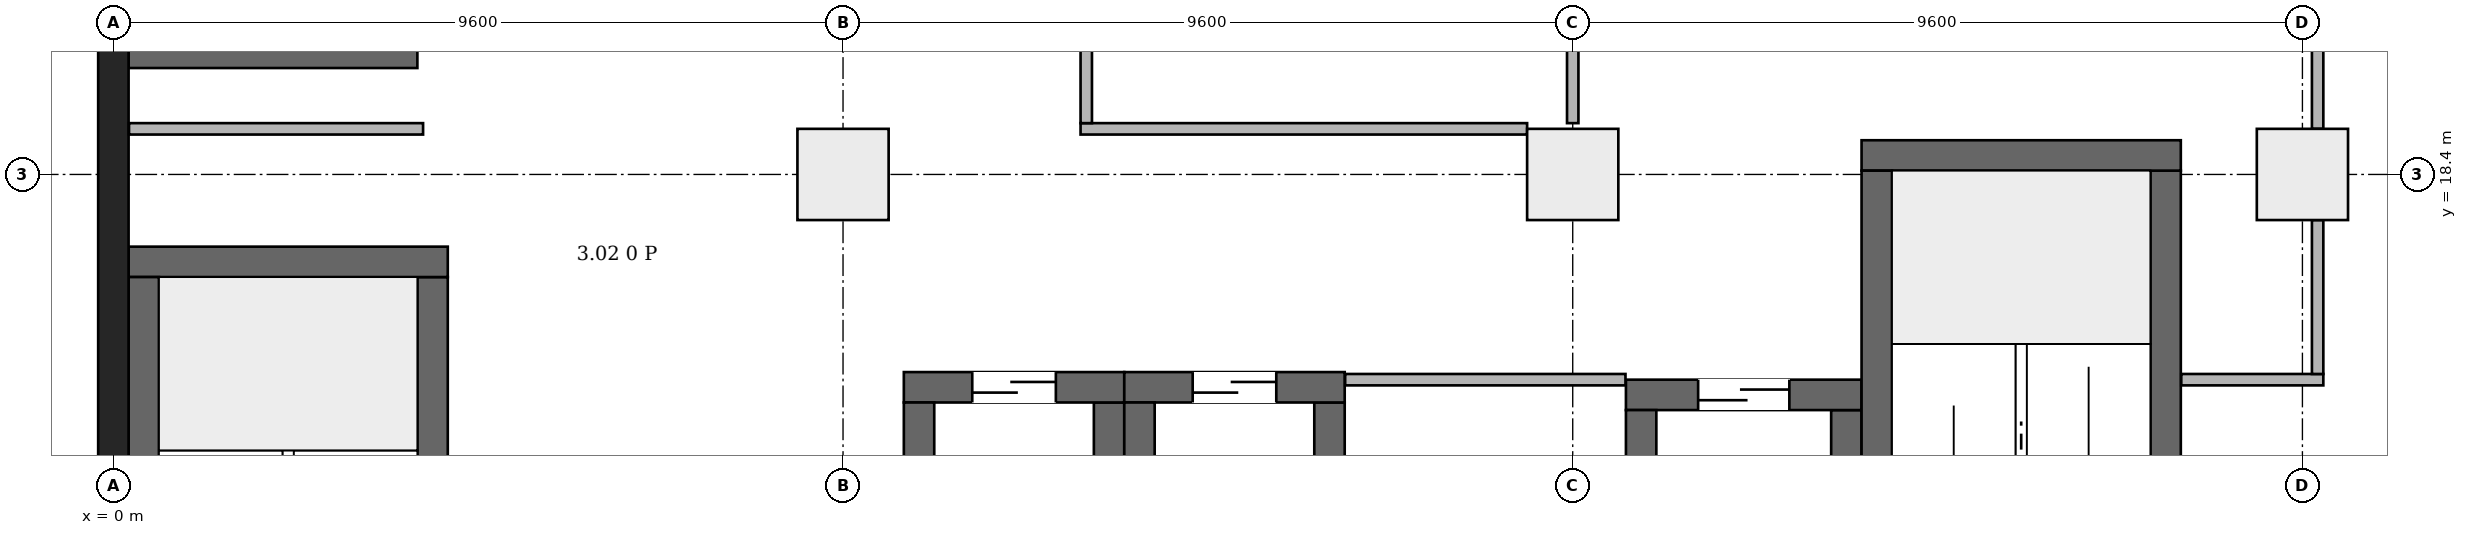
"""IFC4 building model, lengths in metres.
Left out: names, types, materials, properties, quantities, classifications, styles, units other than length and angle.
Written with IfcOpenShell. Run it as: python <this file> out.ifc"""

import sys

from ifc_helpers import new_model, si_unit, direction, frame, frame_2d, origin, origin_2d, place, context, subcontext, project, spatial, rectangle, extrude, element, fill, save


model = new_model("IFC4")
c1 = context("Model", 3, precision=1e-05, world=origin(), true_north=direction((0.0, 1.0)))
c2 = subcontext(c1, "Body", "Model", "MODEL_VIEW")
j1 = project(units=[si_unit("LENGTHUNIT", "METRE"), si_unit("PLANEANGLEUNIT", "RADIAN")], contexts=[c1])
p1 = place(None, origin())
s1 = spatial("IfcSite", under=j1, at=p1, CompositionType="ELEMENT")
p2 = place(p1, origin())
s2 = spatial("IfcBuilding", under=s1, at=p2, CompositionType="ELEMENT")
p3 = place(p2, frame((0.0, 0.0, 21.7)))
s3 = spatial("IfcBuildingStorey", under=s2, at=p3, CompositionType="ELEMENT", Elevation=21.7)
p4 = place(p3, frame((0.0, -0.2, 0.0), z_axis=(0.0, 0.0, 1.0), x_axis=(0.0, 1.0, 0.0)))
e1 = element("IfcWall", 1, at=p4, inside=s3, PredefinedType="SHEAR", context=c2, shape_type="SweptSolid", body=[
    extrude(rectangle(XDim=46.88, YDim=0.4, at=frame_2d((23.44, 0.0))), origin(), (0.0, 0.0, 1.0), 5.0),
])
p5 = place(p3, frame((0.2, 17.25, 0.0), z_axis=(0.0, 0.0, 1.0), x_axis=(1.0, 0.0, 0.0)))
e2 = element("IfcWall", 2, at=p5, inside=s3, PredefinedType="SHEAR", context=c2, shape_type="SweptSolid", body=[
    extrude(rectangle(XDim=4.2, YDim=0.4, at=frame_2d((2.1, 0.0))), origin(), (0.0, 0.0, 1.0), 5.0),
])
for number, where, z_axis, x_axis in (
    (3, (0.4, 10.45, 0.0), (0.0, 0.0, 1.0), (0.0, 1.0, 0.0)),
    (4, (4.2, 10.45, 0.0), (0.0, 0.0, 1.0), (0.0, 1.0, 0.0)),
):
    element("IfcWall", number, at=place(p3, frame(where, z_axis=z_axis, x_axis=x_axis)), inside=s3, PredefinedType="SHEAR", context=c2, shape_type="SweptSolid", body=[
        extrude(rectangle(XDim=6.6, YDim=0.4, at=frame_2d((3.3, 0.0))), origin(), (0.0, 0.0, 1.0), 5.0),
    ])
p6 = place(p3, frame((23.0, 18.65, 0.0), z_axis=(0.0, 0.0, 1.0), x_axis=(1.0, 0.0, 0.0)))
e5 = element("IfcWall", 5, at=p6, inside=s3, PredefinedType="SHEAR", context=c2, shape_type="SweptSolid", body=[
    extrude(rectangle(XDim=4.2, YDim=0.4, at=frame_2d((2.1, 0.0))), origin(), (0.0, 0.0, 1.0), 5.0),
])
for number, where, z_axis, x_axis in (
    (6, (23.2, 11.85, 0.0), (0.0, 0.0, 1.0), (0.0, 1.0, 0.0)),
    (7, (27.0, 11.85, 0.0), (0.0, 0.0, 1.0), (0.0, 1.0, 0.0)),
):
    element("IfcWall", number, at=place(p3, frame(where, z_axis=z_axis, x_axis=x_axis)), inside=s3, PredefinedType="SHEAR", context=c2, shape_type="SweptSolid", body=[
        extrude(rectangle(XDim=6.6, YDim=0.4, at=frame_2d((3.3, 0.0))), origin(), (0.0, 0.0, 1.0), 5.0),
    ])
p7 = place(p3, frame((0.2, 19.975, 0.0), z_axis=(0.0, 0.0, 1.0), x_axis=(1.0, 0.0, 0.0)))
e8 = element("IfcWall", 8, at=p7, inside=s3, PredefinedType="SHEAR", context=c2, shape_type="SweptSolid", body=[
    extrude(rectangle(XDim=3.8, YDim=0.35, at=frame_2d((1.9, 0.0))), origin(), (0.0, 0.0, 1.0), 5.0),
])
p8 = place(p3, frame((10.4, 15.6, 0.0), z_axis=(0.0, 0.0, 1.0), x_axis=(1.0, 0.0, 0.0)))
e9 = element("IfcWall", 9, at=p8, inside=s3, PredefinedType="SHEAR", context=c2, shape_type="SweptSolid", body=[
    extrude(rectangle(XDim=2.9, YDim=0.4, at=frame_2d((1.45, 0.0))), origin(), (0.0, 0.0, 1.0), 5.0),
])
p9 = place(p8, frame((0.9, 0.0, 0.0)))
e10 = element("IfcOpeningElement", 10, at=p9, cuts=e9, PredefinedType="OPENING", context=c2, shape_type="SweptSolid", body=[
    extrude(rectangle(XDim=1.1, YDim=2.1, at=frame_2d((0.55, 1.05))), frame((0.0, 0.21, 0.0), z_axis=(0.0, -1.0, 0.0), x_axis=(1.0, 0.0, 0.0)), (0.0, 0.0, 1.0), 0.42),
])
for number, where, z_axis, x_axis in (
    (11, (10.6, 12.4, 0.0), (0.0, 0.0, 1.0), (0.0, 1.0, 0.0)),
    (12, (13.1, 12.4, 0.0), (0.0, 0.0, 1.0), (0.0, 1.0, 0.0)),
):
    element("IfcWall", number, at=place(p3, frame(where, z_axis=z_axis, x_axis=x_axis)), inside=s3, PredefinedType="SHEAR", context=c2, shape_type="SweptSolid", body=[
        extrude(rectangle(XDim=3.0, YDim=0.4, at=frame_2d((1.5, 0.0))), origin(), (0.0, 0.0, 1.0), 5.0),
    ])
p10 = place(p3, frame((13.3, 15.6, 0.0), z_axis=(0.0, 0.0, 1.0), x_axis=(1.0, 0.0, 0.0)))
e13 = element("IfcWall", 13, at=p10, inside=s3, PredefinedType="SHEAR", context=c2, shape_type="SweptSolid", body=[
    extrude(rectangle(XDim=2.9, YDim=0.4, at=frame_2d((1.45, 0.0))), origin(), (0.0, 0.0, 1.0), 5.0),
])
p11 = place(p10, frame((0.9, 0.0, 0.0)))
e14 = element("IfcOpeningElement", 14, at=p11, cuts=e13, PredefinedType="OPENING", context=c2, shape_type="SweptSolid", body=[
    extrude(rectangle(XDim=1.1, YDim=2.1, at=frame_2d((0.55, 1.05))), frame((0.0, 0.21, 0.0), z_axis=(0.0, -1.0, 0.0), x_axis=(1.0, 0.0, 0.0)), (0.0, 0.0, 1.0), 0.42),
])
for number, where, z_axis, x_axis in (
    (15, (13.5, 12.4, 0.0), (0.0, 0.0, 1.0), (0.0, 1.0, 0.0)),
    (16, (16.0, 12.4, 0.0), (0.0, 0.0, 1.0), (0.0, 1.0, 0.0)),
):
    element("IfcWall", number, at=place(p3, frame(where, z_axis=z_axis, x_axis=x_axis)), inside=s3, PredefinedType="SHEAR", context=c2, shape_type="SweptSolid", body=[
        extrude(rectangle(XDim=3.0, YDim=0.4, at=frame_2d((1.5, 0.0))), origin(), (0.0, 0.0, 1.0), 5.0),
    ])
p12 = place(p3, frame((19.9, 15.5, 0.0), z_axis=(0.0, 0.0, 1.0), x_axis=(1.0, 0.0, 0.0)))
e17 = element("IfcWall", 17, at=p12, inside=s3, PredefinedType="SHEAR", context=c2, shape_type="SweptSolid", body=[
    extrude(rectangle(XDim=3.1, YDim=0.4, at=frame_2d((1.55, 0.0))), origin(), (0.0, 0.0, 1.0), 5.0),
])
p13 = place(p12, frame((0.95, 0.0, 0.0)))
e18 = element("IfcOpeningElement", 18, at=p13, cuts=e17, PredefinedType="OPENING", context=c2, shape_type="SweptSolid", body=[
    extrude(rectangle(XDim=1.2, YDim=2.1, at=frame_2d((0.6, 1.05))), frame((0.0, 0.21, 0.0), z_axis=(0.0, -1.0, 0.0), x_axis=(1.0, 0.0, 0.0)), (0.0, 0.0, 1.0), 0.42),
])
for number, where, z_axis, x_axis in (
    (19, (20.1, 11.9, 0.0), (0.0, 0.0, 1.0), (0.0, 1.0, 0.0)),
    (20, (22.8, 11.9, 0.0), (0.0, 0.0, 1.0), (0.0, 1.0, 0.0)),
):
    element("IfcWall", number, at=place(p3, frame(where, z_axis=z_axis, x_axis=x_axis)), inside=s3, PredefinedType="SHEAR", context=c2, shape_type="SweptSolid", body=[
        extrude(rectangle(XDim=3.4, YDim=0.4, at=frame_2d((1.7, 0.0))), origin(), (0.0, 0.0, 1.0), 5.0),
    ])
for number, where, z_axis, x_axis in (
    (21, (9.6, 18.4, 0.0), (0.0, 0.0, 1.0), (1.0, 0.0, 0.0)),
    (22, (19.2, 18.4, 0.0), (0.0, 0.0, 1.0), (1.0, 0.0, 0.0)),
    (23, (28.8, 18.4, 0.0), (0.0, 0.0, 1.0), (1.0, 0.0, 0.0)),
):
    element("IfcColumn", number, at=place(p3, frame(where, z_axis=z_axis, x_axis=x_axis)), inside=s3, PredefinedType="COLUMN", context=c2, shape_type="SweptSolid", body=[
        extrude(rectangle(XDim=1.2, YDim=1.2, at=origin_2d()), origin(), (0.0, 0.0, 1.0), 5.0),
    ])
p14 = place(p3, frame((0.206, 19.0, 0.0), z_axis=(0.0, 0.0, 1.0), x_axis=(1.0, 0.0, 0.0)))
e24 = element("IfcWall", 24, at=p14, inside=s3, PredefinedType="PARTITIONING", context=c2, shape_type="SweptSolid", body=[
    extrude(rectangle(XDim=3.869, YDim=0.15, at=frame_2d((1.935, 0.0))), origin(), (0.0, 0.0, 1.0), 4.65),
])
p15 = place(p3, frame((12.725, 19.0, 0.0), z_axis=(0.0, 0.0, 1.0), x_axis=(1.0, 0.0, 0.0)))
e25 = element("IfcWall", 25, at=p15, inside=s3, PredefinedType="PARTITIONING", context=c2, shape_type="SweptSolid", body=[
    extrude(rectangle(XDim=5.875, YDim=0.15, at=frame_2d((2.938, 0.0))), origin(), (0.0, 0.0, 1.0), 4.65),
])
p16 = place(p3, frame((12.8, 19.075, 0.0), z_axis=(0.0, 0.0, 1.0), x_axis=(0.0, 1.0, 0.0)))
e26 = element("IfcWall", 26, at=p16, inside=s3, PredefinedType="PARTITIONING", context=c2, shape_type="SweptSolid", body=[
    extrude(rectangle(XDim=2.05, YDim=0.15, at=frame_2d((1.025, 0.0))), origin(), (0.0, 0.0, 1.0), 4.65),
])
p17 = place(p3, frame((16.206, 15.7, 0.0), z_axis=(0.0, 0.0, 1.0), x_axis=(1.0, 0.0, 0.0)))
e27 = element("IfcWall", 27, at=p17, inside=s3, PredefinedType="PARTITIONING", context=c2, shape_type="SweptSolid", body=[
    extrude(rectangle(XDim=3.688, YDim=0.15, at=frame_2d((1.844, 0.0))), origin(), (0.0, 0.0, 1.0), 4.65),
])
p18 = place(p3, frame((19.2, 19.075, 0.0), z_axis=(0.0, 0.0, 1.0), x_axis=(0.0, 1.0, 0.0)))
e28 = element("IfcWall", 28, at=p18, inside=s3, PredefinedType="PARTITIONING", context=c2, shape_type="SweptSolid", body=[
    extrude(rectangle(XDim=2.05, YDim=0.15, at=frame_2d((1.025, 0.0))), origin(), (0.0, 0.0, 1.0), 4.25),
])
p19 = place(p3, frame((27.206, 15.7, 0.0), z_axis=(0.0, 0.0, 1.0), x_axis=(1.0, 0.0, 0.0)))
e29 = element("IfcWall", 29, at=p19, inside=s3, PredefinedType="PARTITIONING", context=c2, shape_type="SweptSolid", body=[
    extrude(rectangle(XDim=1.869, YDim=0.15, at=frame_2d((0.935, 0.0))), origin(), (0.0, 0.0, 1.0), 4.65),
])
p20 = place(p3, frame((29.0, 15.775, 0.0), z_axis=(0.0, 0.0, 1.0), x_axis=(0.0, 1.0, 0.0)))
e30 = element("IfcWall", 30, at=p20, inside=s3, PredefinedType="PARTITIONING", context=c2, shape_type="SweptSolid", body=[
    extrude(rectangle(XDim=2.025, YDim=0.15, at=frame_2d((1.013, 0.0))), origin(), (0.0, 0.0, 1.0), 4.25),
])
p21 = place(p3, frame((29.0, 19.0, 0.0), z_axis=(0.0, 0.0, 1.0), x_axis=(0.0, 1.0, 0.0)))
e31 = element("IfcWall", 31, at=p21, inside=s3, PredefinedType="PARTITIONING", context=c2, shape_type="SweptSolid", body=[
    extrude(rectangle(XDim=2.275, YDim=0.15, at=frame_2d((1.137, 0.0))), origin(), (0.0, 0.0, 1.0), 4.25),
])
p22 = place(p9, origin())
e32 = element("IfcDoor", 32, at=p22, inside=s3, OperationType="DOUBLE_DOOR_SLIDING", PredefinedType="DOOR", context=c2, shape_type="SweptSolid", body=[
    extrude(rectangle(XDim=1.1, YDim=2.1, at=frame_2d((0.55, 1.05))), frame((0.0, 0.025, 0.0), z_axis=(0.0, -1.0, 0.0), x_axis=(1.0, 0.0, 0.0)), (0.0, 0.0, 1.0), 0.05),
])
fill(e10, e32)
p23 = place(p11, origin())
e33 = element("IfcDoor", 33, at=p23, inside=s3, OperationType="DOUBLE_DOOR_SLIDING", PredefinedType="DOOR", context=c2, shape_type="SweptSolid", body=[
    extrude(rectangle(XDim=1.1, YDim=2.1, at=frame_2d((0.55, 1.05))), frame((0.0, 0.025, 0.0), z_axis=(0.0, -1.0, 0.0), x_axis=(1.0, 0.0, 0.0)), (0.0, 0.0, 1.0), 0.05),
])
fill(e14, e33)
p24 = place(p13, origin())
e34 = element("IfcDoor", 34, at=p24, inside=s3, OperationType="DOUBLE_DOOR_SLIDING", PredefinedType="DOOR", context=c2, shape_type="SweptSolid", body=[
    extrude(rectangle(XDim=1.2, YDim=2.1, at=frame_2d((0.6, 1.05))), frame((0.0, 0.025, 0.0), z_axis=(0.0, -1.0, 0.0), x_axis=(1.0, 0.0, 0.0)), (0.0, 0.0, 1.0), 0.05),
])
fill(e18, e34)
save(model, sys.argv[1])
